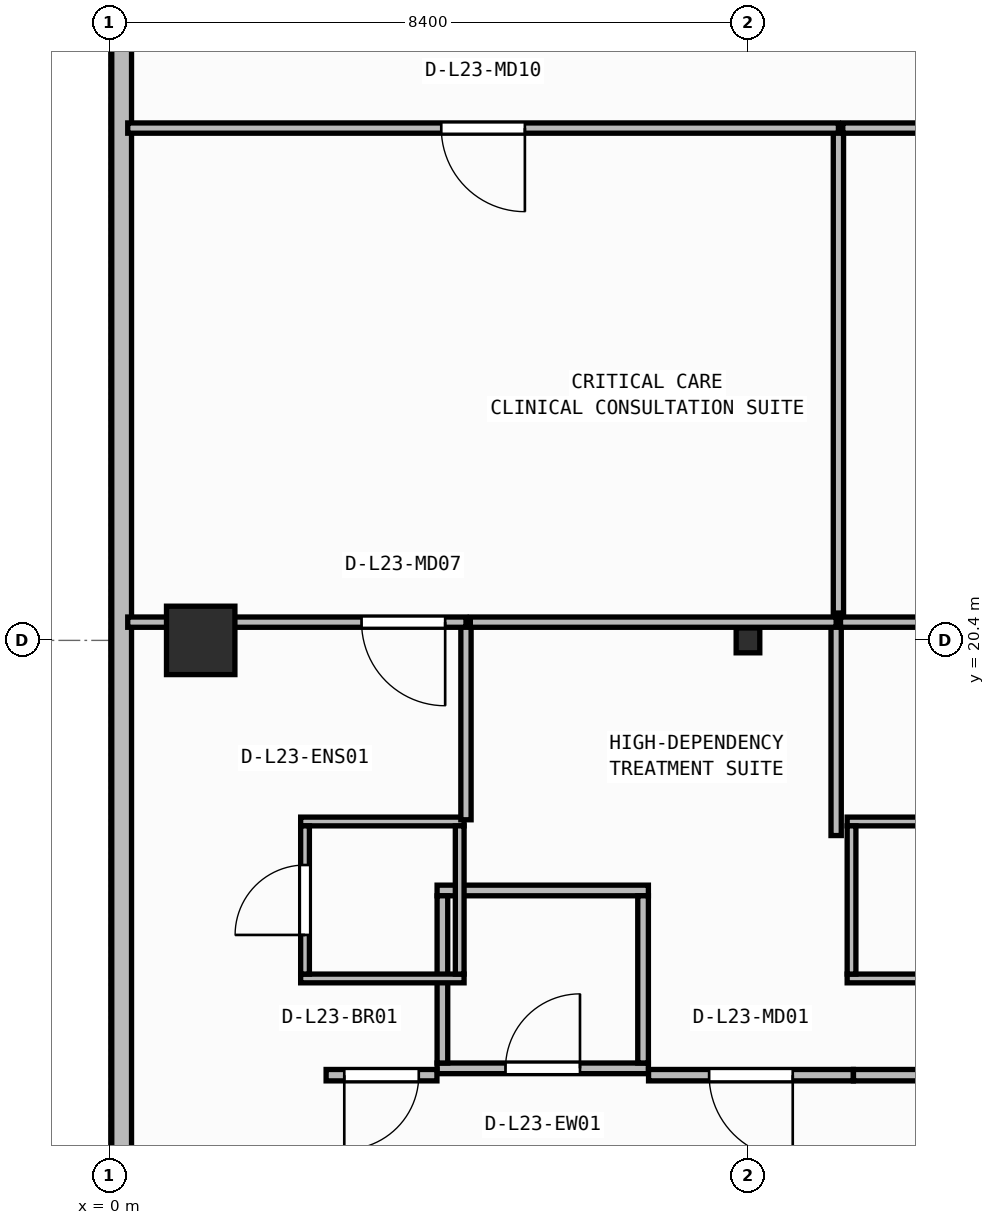
"""IFC4 building model, lengths in metres.
Left out: names, types, materials, properties, quantities, classifications, styles, units other than length and angle.
Written with IfcOpenShell. Run it as: python <this file> out.ifc"""

import sys

from ifc_helpers import new_model, si_unit, direction, frame, frame_2d, origin, origin_2d, place, context, subcontext, project, spatial, rectangle, i_section, extrude, element, fill, save


model = new_model("IFC4")
c1 = context("Model", 3, precision=1e-05, world=origin(), true_north=direction((0.0, 1.0)))
c2 = subcontext(c1, "Body", "Model", "MODEL_VIEW")
j1 = project(units=[si_unit("LENGTHUNIT", "METRE"), si_unit("PLANEANGLEUNIT", "RADIAN")], contexts=[c1])
p1 = place(None, origin())
s1 = spatial("IfcSite", under=j1, at=p1, CompositionType="ELEMENT")
p2 = place(p1, origin())
s2 = spatial("IfcBuilding", under=s1, at=p2, CompositionType="ELEMENT")
p3 = place(p2, frame((0.0, 0.0, 93.6)))
s3 = spatial("IfcBuildingStorey", under=s2, at=p3, CompositionType="ELEMENT", Elevation=93.6)
p4 = place(p3, frame((1.2, 20.4, 0.0), z_axis=(0.0, 0.0, 1.0), x_axis=(1.0, 0.0, 0.0)))
e1 = element("IfcColumn", 1, at=p4, inside=s3, PredefinedType="COLUMN", context=c2, shape_type="SweptSolid", body=[
    extrude(rectangle(XDim=0.9, YDim=0.9, at=origin_2d()), origin(), (0.0, 0.0, 1.0), 3.95),
])
p5 = place(p3, frame((8.4, 20.4, 0.0), z_axis=(0.0, 0.0, 1.0), x_axis=(1.0, 0.0, 0.0)))
e2 = element("IfcColumn", 2, at=p5, inside=s3, PredefinedType="COLUMN", context=c2, shape_type="SweptSolid", body=[
    extrude(i_section(OverallWidth=0.311, OverallDepth=0.327, WebThickness=0.016, FlangeThickness=0.025, FilletRadius=0.017, at=origin_2d()), origin(), (0.0, 0.0, 1.0), 3.95),
])
p6 = place(p3, frame((0.16, 41.04, 0.0), z_axis=(0.0, 0.0, 1.0), x_axis=(0.0, -1.0, 0.0)))
e3 = element("IfcWall", 3, at=p6, inside=s3, PredefinedType="STANDARD", context=c2, shape_type="SweptSolid", body=[
    extrude(rectangle(XDim=38.28, YDim=0.26, at=frame_2d((19.14, 0.0))), origin(), (0.0, 0.0, 1.0), 3.67),
])
p7 = place(p6, frame((28.15, 0.0, 0.9)))
e4 = element("IfcOpeningElement", 4, at=p7, cuts=e3, PredefinedType="OPENING", context=c2, shape_type="SweptSolid", body=[
    extrude(rectangle(XDim=2.4, YDim=1.65, at=frame_2d((1.2, 0.825))), frame((0.0, 0.14, 0.0), z_axis=(0.0, -1.0, 0.0), x_axis=(1.0, 0.0, 0.0)), (0.0, 0.0, 1.0), 0.28),
])
p8 = place(p3, frame((4.31, 14.77, 0.0), z_axis=(0.0, 0.0, 1.0), x_axis=(1.0, 0.0, 0.0)))
e5 = element("IfcWall", 5, at=p8, inside=s3, PredefinedType="PARTITIONING", context=c2, shape_type="SweptSolid", body=[
    extrude(rectangle(XDim=2.78, YDim=0.14, at=frame_2d((1.39, 0.0))), origin(), (0.0, 0.0, 1.0), 3.67),
])
p9 = place(p8, frame((0.9, 0.0, 0.0)))
e6 = element("IfcOpeningElement", 6, at=p9, cuts=e5, PredefinedType="OPENING", context=c2, shape_type="SweptSolid", body=[
    extrude(rectangle(XDim=0.98, YDim=2.1, at=frame_2d((0.49, 1.05))), frame((0.0, 0.08, 0.0), z_axis=(0.0, -1.0, 0.0), x_axis=(1.0, 0.0, 0.0)), (0.0, 0.0, 1.0), 0.16),
])
p10 = place(p3, frame((4.31, 17.11, 0.0), z_axis=(0.0, 0.0, 1.0), x_axis=(1.0, 0.0, 0.0)))
e7 = element("IfcWall", 7, at=p10, inside=s3, PredefinedType="PARTITIONING", context=c2, shape_type="SweptSolid", body=[
    extrude(rectangle(XDim=2.78, YDim=0.14, at=frame_2d((1.39, 0.0))), origin(), (0.0, 0.0, 1.0), 3.67),
])
for number, where, z_axis, x_axis in (
    (8, (4.38, 14.84, 0.0), (0.0, 0.0, 1.0), (0.0, 1.0, 0.0)),
    (9, (7.02, 14.84, 0.0), (0.0, 0.0, 1.0), (0.0, 1.0, 0.0)),
):
    element("IfcWall", number, at=place(p3, frame(where, z_axis=z_axis, x_axis=x_axis)), inside=s3, PredefinedType="PARTITIONING", context=c2, shape_type="SweptSolid", body=[
        extrude(rectangle(XDim=2.2, YDim=0.14, at=frame_2d((1.1, 0.0))), origin(), (0.0, 0.0, 1.0), 3.67),
    ])
for number, where, z_axis, x_axis in (
    (10, (2.515, 15.952, 0.0), (0.0, 0.0, 1.0), (1.0, 0.0, 0.0)),
    (11, (2.515, 18.018, 0.0), (0.0, 0.0, 1.0), (1.0, 0.0, 0.0)),
):
    element("IfcWall", number, at=place(p3, frame(where, z_axis=z_axis, x_axis=x_axis)), inside=s3, PredefinedType="PARTITIONING", context=c2, shape_type="SweptSolid", body=[
        extrude(rectangle(XDim=2.15, YDim=0.115, at=frame_2d((1.075, 0.0))), origin(), (0.0, 0.0, 1.0), 3.67),
    ])
p11 = place(p3, frame((2.573, 16.01, 0.0), z_axis=(0.0, 0.0, 1.0), x_axis=(0.0, 1.0, 0.0)))
e12 = element("IfcWall", 12, at=p11, inside=s3, PredefinedType="PARTITIONING", context=c2, shape_type="SweptSolid", body=[
    extrude(rectangle(XDim=1.95, YDim=0.115, at=frame_2d((0.975, 0.0))), origin(), (0.0, 0.0, 1.0), 3.67),
])
p12 = place(p11, frame((0.515, 0.0, 0.0)))
e13 = element("IfcOpeningElement", 13, at=p12, cuts=e12, PredefinedType="OPENING", context=c2, shape_type="SweptSolid", body=[
    extrude(rectangle(XDim=0.92, YDim=2.1, at=frame_2d((0.46, 1.05))), frame((0.0, 0.067, 0.0), z_axis=(0.0, -1.0, 0.0), x_axis=(1.0, 0.0, 0.0)), (0.0, 0.0, 1.0), 0.135),
])
p13 = place(p3, frame((4.607, 16.01, 0.0), z_axis=(0.0, 0.0, 1.0), x_axis=(0.0, 1.0, 0.0)))
e14 = element("IfcWall", 14, at=p13, inside=s3, PredefinedType="PARTITIONING", context=c2, shape_type="SweptSolid", body=[
    extrude(rectangle(XDim=1.95, YDim=0.115, at=frame_2d((0.975, 0.0))), origin(), (0.0, 0.0, 1.0), 3.67),
])
for number, where, z_axis, x_axis in (
    (15, (9.705, 15.952, 0.0), (0.0, 0.0, 1.0), (1.0, 0.0, 0.0)),
    (16, (9.705, 18.018, 0.0), (0.0, 0.0, 1.0), (1.0, 0.0, 0.0)),
):
    element("IfcWall", number, at=place(p3, frame(where, z_axis=z_axis, x_axis=x_axis)), inside=s3, PredefinedType="PARTITIONING", context=c2, shape_type="SweptSolid", body=[
        extrude(rectangle(XDim=2.15, YDim=0.115, at=frame_2d((1.075, 0.0))), origin(), (0.0, 0.0, 1.0), 3.67),
    ])
p14 = place(p3, frame((9.762, 16.01, 0.0), z_axis=(0.0, 0.0, 1.0), x_axis=(0.0, 1.0, 0.0)))
e17 = element("IfcWall", 17, at=p14, inside=s3, PredefinedType="PARTITIONING", context=c2, shape_type="SweptSolid", body=[
    extrude(rectangle(XDim=1.95, YDim=0.115, at=frame_2d((0.975, 0.0))), origin(), (0.0, 0.0, 1.0), 3.67),
])
p15 = place(p3, frame((4.308, 14.68, 0.0), z_axis=(0.0, 0.0, 1.0), x_axis=(-1.0, 0.0, 0.0)))
e18 = element("IfcWall", 18, at=p15, inside=s3, PredefinedType="PARTITIONING", context=c2, shape_type="SweptSolid", body=[
    extrude(rectangle(XDim=1.458, YDim=0.15, at=frame_2d((0.729, 0.0))), origin(), (0.0, 0.0, 1.0), 3.67),
])
p16 = place(p15, frame((0.239, 0.0, 0.0)))
e19 = element("IfcOpeningElement", 19, at=p16, cuts=e18, PredefinedType="OPENING", context=c2, shape_type="SweptSolid", body=[
    extrude(rectangle(XDim=0.98, YDim=2.1, at=frame_2d((0.49, 1.05))), frame((0.0, 0.085, 0.0), z_axis=(0.0, -1.0, 0.0), x_axis=(1.0, 0.0, 0.0)), (0.0, 0.0, 1.0), 0.17),
])
p17 = place(p3, frame((9.786, 14.68, 0.0), z_axis=(0.0, 0.0, 1.0), x_axis=(-1.0, 0.0, 0.0)))
e20 = element("IfcWall", 20, at=p17, inside=s3, PredefinedType="PARTITIONING", context=c2, shape_type="SweptSolid", body=[
    extrude(rectangle(XDim=2.694, YDim=0.15, at=frame_2d((1.347, 0.0))), origin(), (0.0, 0.0, 1.0), 3.67),
])
p18 = place(p17, frame((0.797, 0.0, 0.0)))
e21 = element("IfcOpeningElement", 21, at=p18, cuts=e20, PredefinedType="OPENING", context=c2, shape_type="SweptSolid", body=[
    extrude(rectangle(XDim=1.1, YDim=2.1, at=frame_2d((0.55, 1.05))), frame((0.0, 0.085, 0.0), z_axis=(0.0, -1.0, 0.0), x_axis=(1.0, 0.0, 0.0)), (0.0, 0.0, 1.0), 0.17),
])
p19 = place(p3, frame((13.936, 14.68, 0.0), z_axis=(0.0, 0.0, 1.0), x_axis=(-1.0, 0.0, 0.0)))
e22 = element("IfcWall", 22, at=p19, inside=s3, PredefinedType="PARTITIONING", context=c2, shape_type="SweptSolid", body=[
    extrude(rectangle(XDim=4.148, YDim=0.15, at=frame_2d((2.074, 0.0))), origin(), (0.0, 0.0, 1.0), 3.67),
])
p20 = place(p19, frame((1.524, 0.0, 0.0)))
e23 = element("IfcOpeningElement", 23, at=p20, cuts=e22, PredefinedType="OPENING", context=c2, shape_type="SweptSolid", body=[
    extrude(rectangle(XDim=1.1, YDim=2.1, at=frame_2d((0.55, 1.05))), frame((0.0, 0.085, 0.0), z_axis=(0.0, -1.0, 0.0), x_axis=(1.0, 0.0, 0.0)), (0.0, 0.0, 1.0), 0.17),
])
p21 = place(p3, frame((4.69, 18.04, 0.0), z_axis=(0.0, 0.0, 1.0), x_axis=(0.0, 1.0, 0.0)))
e24 = element("IfcWall", 24, at=p21, inside=s3, PredefinedType="PARTITIONING", context=c2, shape_type="SweptSolid", body=[
    extrude(rectangle(XDim=2.6, YDim=0.135, at=frame_2d((1.3, 0.0))), origin(), (0.0, 0.0, 1.0), 3.67),
])
p22 = place(p3, frame((4.69, 20.64, 0.0), z_axis=(0.0, 0.0, 1.0), x_axis=(-1.0, 0.0, 0.0)))
e25 = element("IfcWall", 25, at=p22, inside=s3, PredefinedType="PARTITIONING", context=c2, shape_type="SweptSolid", body=[
    extrude(rectangle(XDim=4.45, YDim=0.135, at=frame_2d((2.225, 0.0))), origin(), (0.0, 0.0, 1.0), 3.033),
])
p23 = place(p22, frame((0.274, 0.0, 0.0)))
e26 = element("IfcOpeningElement", 26, at=p23, cuts=e25, PredefinedType="OPENING", context=c2, shape_type="SweptSolid", body=[
    extrude(rectangle(XDim=1.1, YDim=2.1, at=frame_2d((0.55, 1.05))), frame((0.0, 0.077, 0.0), z_axis=(0.0, -1.0, 0.0), x_axis=(1.0, 0.0, 0.0)), (0.0, 0.0, 1.0), 0.155),
])
p24 = place(p3, frame((9.56, 17.833, 0.0), z_axis=(0.0, 0.0, 1.0), x_axis=(0.0, 1.0, 0.0)))
e27 = element("IfcWall", 27, at=p24, inside=s3, PredefinedType="PARTITIONING", context=c2, shape_type="SweptSolid", body=[
    extrude(rectangle(XDim=2.807, YDim=0.135, at=frame_2d((1.404, 0.0))), origin(), (0.0, 0.0, 1.0), 3.67),
])
p25 = place(p3, frame((9.56, 20.64, 0.0), z_axis=(0.0, 0.0, 1.0), x_axis=(-1.0, 0.0, 0.0)))
e28 = element("IfcWall", 28, at=p25, inside=s3, PredefinedType="PARTITIONING", context=c2, shape_type="SweptSolid", body=[
    extrude(rectangle(XDim=4.812, YDim=0.135, at=frame_2d((2.406, 0.0))), origin(), (0.0, 0.0, 1.0), 3.033),
])
p26 = place(p3, frame((13.71, 20.64, 0.0), z_axis=(0.0, 0.0, 1.0), x_axis=(-1.0, 0.0, 0.0)))
e29 = element("IfcWall", 29, at=p26, inside=s3, PredefinedType="PARTITIONING", context=c2, shape_type="SweptSolid", body=[
    extrude(rectangle(XDim=4.093, YDim=0.135, at=frame_2d((2.046, 0.0))), origin(), (0.0, 0.0, 1.0), 3.033),
])
p27 = place(p26, frame((0.265, 0.0, 0.0)))
e30 = element("IfcOpeningElement", 30, at=p27, cuts=e29, PredefinedType="OPENING", context=c2, shape_type="SweptSolid", body=[
    extrude(rectangle(XDim=1.1, YDim=2.1, at=frame_2d((0.55, 1.05))), frame((0.0, 0.077, 0.0), z_axis=(0.0, -1.0, 0.0), x_axis=(1.0, 0.0, 0.0)), (0.0, 0.0, 1.0), 0.155),
])
p28 = place(p3, frame((9.59, 20.76, 0.0), z_axis=(0.0, 0.0, 1.0), x_axis=(0.0, 1.0, 0.0)))
e31 = element("IfcWall", 31, at=p28, inside=s3, PredefinedType="PARTITIONING", context=c2, shape_type="SweptSolid", body=[
    extrude(rectangle(XDim=6.38, YDim=0.135, at=frame_2d((3.19, 0.0))), origin(), (0.0, 0.0, 1.0), 3.67),
])
p29 = place(p3, frame((9.59, 27.14, 0.0), z_axis=(0.0, 0.0, 1.0), x_axis=(-1.0, 0.0, 0.0)))
e32 = element("IfcWall", 32, at=p29, inside=s3, PredefinedType="PARTITIONING", context=c2, shape_type="SweptSolid", body=[
    extrude(rectangle(XDim=9.35, YDim=0.135, at=frame_2d((4.675, 0.0))), origin(), (0.0, 0.0, 1.0), 3.67),
])
p30 = place(p29, frame((4.125, 0.0, 0.0)))
e33 = element("IfcOpeningElement", 33, at=p30, cuts=e32, PredefinedType="OPENING", context=c2, shape_type="SweptSolid", body=[
    extrude(rectangle(XDim=1.1, YDim=2.1, at=frame_2d((0.55, 1.05))), frame((0.0, 0.077, 0.0), z_axis=(0.0, -1.0, 0.0), x_axis=(1.0, 0.0, 0.0)), (0.0, 0.0, 1.0), 0.155),
])
p31 = place(p3, frame((18.748, 27.14, 0.0), z_axis=(0.0, 0.0, 1.0), x_axis=(-1.0, 0.0, 0.0)))
e34 = element("IfcWall", 34, at=p31, inside=s3, PredefinedType="PARTITIONING", context=c2, shape_type="SweptSolid", body=[
    extrude(rectangle(XDim=9.1, YDim=0.135, at=frame_2d((4.55, 0.0))), origin(), (0.0, 0.0, 1.0), 3.67),
])
p32 = place(p9, origin())
e35 = element("IfcDoor", 35, at=p32, inside=s3, OperationType="SINGLE_SWING_RIGHT", PredefinedType="DOOR", context=c2, shape_type="SweptSolid", body=[
    extrude(rectangle(XDim=0.98, YDim=2.1, at=frame_2d((0.49, 1.05))), frame((0.0, 0.025, 0.0), z_axis=(0.0, -1.0, 0.0), x_axis=(1.0, 0.0, 0.0)), (0.0, 0.0, 1.0), 0.05),
])
fill(e6, e35)
p33 = place(p12, origin())
e36 = element("IfcDoor", 36, at=p33, inside=s3, OperationType="SINGLE_SWING_LEFT", PredefinedType="DOOR", context=c2, shape_type="SweptSolid", body=[
    extrude(rectangle(XDim=0.92, YDim=2.1, at=frame_2d((0.46, 1.05))), frame((0.0, 0.025, 0.0), z_axis=(0.0, -1.0, 0.0), x_axis=(1.0, 0.0, 0.0)), (0.0, 0.0, 1.0), 0.05),
])
fill(e13, e36)
p34 = place(p16, origin())
e37 = element("IfcDoor", 37, at=p34, inside=s3, OperationType="SINGLE_SWING_RIGHT", PredefinedType="DOOR", context=c2, shape_type="SweptSolid", body=[
    extrude(rectangle(XDim=0.98, YDim=2.1, at=frame_2d((0.49, 1.05))), frame((0.0, 0.025, 0.0), z_axis=(0.0, -1.0, 0.0), x_axis=(1.0, 0.0, 0.0)), (0.0, 0.0, 1.0), 0.05),
])
fill(e19, e37)
p35 = place(p18, origin())
e38 = element("IfcDoor", 38, at=p35, inside=s3, OperationType="SINGLE_SWING_LEFT", PredefinedType="DOOR", context=c2, shape_type="SweptSolid", body=[
    extrude(rectangle(XDim=1.1, YDim=2.1, at=frame_2d((0.55, 1.05))), frame((0.0, 0.025, 0.0), z_axis=(0.0, -1.0, 0.0), x_axis=(1.0, 0.0, 0.0)), (0.0, 0.0, 1.0), 0.05),
])
fill(e21, e38)
p36 = place(p23, origin())
e39 = element("IfcDoor", 39, at=p36, inside=s3, OperationType="SINGLE_SWING_LEFT", PredefinedType="DOOR", context=c2, shape_type="SweptSolid", body=[
    extrude(rectangle(XDim=1.1, YDim=2.1, at=frame_2d((0.55, 1.05))), frame((0.0, 0.025, 0.0), z_axis=(0.0, -1.0, 0.0), x_axis=(1.0, 0.0, 0.0)), (0.0, 0.0, 1.0), 0.05),
])
fill(e26, e39)
p37 = place(p30, origin())
e40 = element("IfcDoor", 40, at=p37, inside=s3, OperationType="SINGLE_SWING_LEFT", PredefinedType="DOOR", context=c2, shape_type="SweptSolid", body=[
    extrude(rectangle(XDim=1.1, YDim=2.1, at=frame_2d((0.55, 1.05))), frame((0.0, 0.025, 0.0), z_axis=(0.0, -1.0, 0.0), x_axis=(1.0, 0.0, 0.0)), (0.0, 0.0, 1.0), 0.05),
])
fill(e33, e40)
save(model, sys.argv[1])
